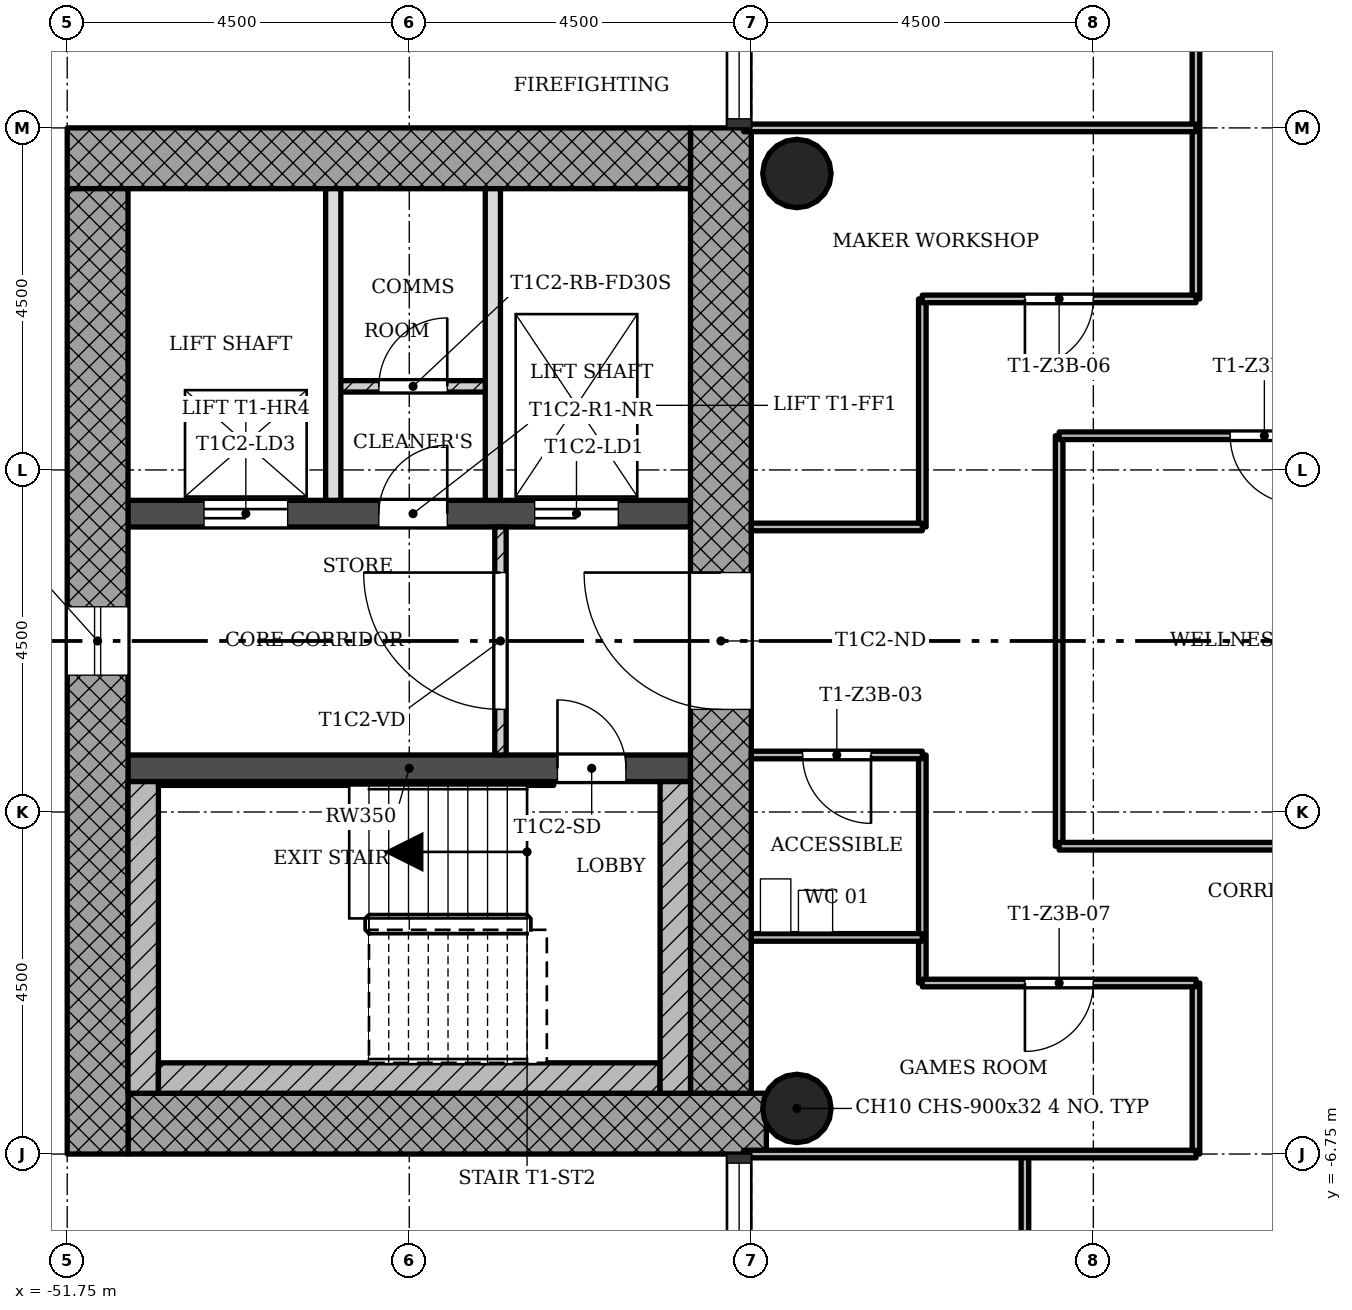
"""IFC4 building model, lengths in metres.
Left out: names, types, materials, properties, quantities, classifications, styles, units other than length and angle.
Written with IfcOpenShell. Run it as: python <this file> out.ifc"""

import sys

from ifc_helpers import new_model, si_unit, direction, frame, frame_2d, origin, origin_2d, place, context, subcontext, project, spatial, rectangle, hollow_circle, extrude, element, fill, save


model = new_model("IFC4")
c1 = context("Model", 3, precision=1e-05, world=origin(), true_north=direction((0.0, 1.0)))
c2 = subcontext(c1, "Body", "Model", "MODEL_VIEW")
j1 = project(units=[si_unit("LENGTHUNIT", "METRE"), si_unit("PLANEANGLEUNIT", "RADIAN")], contexts=[c1])
p1 = place(None, origin())
s1 = spatial("IfcSite", under=j1, at=p1, CompositionType="ELEMENT")
p2 = place(p1, origin())
s2 = spatial("IfcBuilding", under=s1, at=p2, CompositionType="ELEMENT")
p3 = place(p2, frame((0.0, 0.0, 147.3)))
s3 = spatial("IfcBuildingStorey", under=s2, at=p3, CompositionType="ELEMENT", Elevation=147.3)
p4 = place(p3, frame((-50.95, -6.35, 0.0), z_axis=(0.0, 0.0, 1.0), x_axis=(1.0, 0.0, 0.0)))
e1 = element("IfcWall", 1, at=p4, inside=s3, PredefinedType="SHEAR", context=c2, shape_type="SweptSolid", body=[
    extrude(rectangle(XDim=8.398, YDim=0.8, at=frame_2d((4.199, 0.0))), origin(), (0.0, 0.0, 1.0), 3.4),
])
p5 = place(p3, frame((-43.15, -5.95, 0.0), z_axis=(0.0, 0.0, 1.0), x_axis=(0.0, 1.0, 0.0)))
e2 = element("IfcWall", 2, at=p5, inside=s3, PredefinedType="SHEAR", context=c2, shape_type="SweptSolid", body=[
    extrude(rectangle(XDim=12.7, YDim=0.8, at=frame_2d((6.35, 0.0))), origin(), (0.0, 0.0, 1.0), 3.4),
])
p6 = place(p5, frame((5.05, 0.0, 0.0)))
e3 = element("IfcOpeningElement", 3, at=p6, cuts=e2, PredefinedType="OPENING", context=c2, shape_type="SweptSolid", body=[
    extrude(rectangle(XDim=1.8, YDim=2.1, at=frame_2d((0.9, 1.05))), frame((0.0, 0.41, 0.0), z_axis=(0.0, -1.0, 0.0), x_axis=(1.0, 0.0, 0.0)), (0.0, 0.0, 1.0), 0.82),
])
p7 = place(p3, frame((-43.55, 6.35, 0.0), z_axis=(0.0, 0.0, 1.0), x_axis=(-1.0, 0.0, 0.0)))
e4 = element("IfcWall", 4, at=p7, inside=s3, PredefinedType="SHEAR", context=c2, shape_type="SweptSolid", body=[
    extrude(rectangle(XDim=8.2, YDim=0.8, at=frame_2d((4.1, 0.0))), origin(), (0.0, 0.0, 1.0), 3.4),
])
p8 = place(p3, frame((-51.35, 5.95, 0.0), z_axis=(0.0, 0.0, 1.0), x_axis=(0.0, -1.0, 0.0)))
e5 = element("IfcWall", 5, at=p8, inside=s3, PredefinedType="SHEAR", context=c2, shape_type="SweptSolid", body=[
    extrude(rectangle(XDim=12.7, YDim=0.8, at=frame_2d((6.35, 0.0))), origin(), (0.0, 0.0, 1.0), 3.4),
])
p9 = place(p8, frame((5.5, 0.0, 0.45)))
e6 = element("IfcOpeningElement", 6, at=p9, cuts=e5, PredefinedType="OPENING", context=c2, shape_type="SweptSolid", body=[
    extrude(rectangle(XDim=0.9, YDim=2.4, at=frame_2d((0.45, 1.2))), frame((0.0, 0.41, 0.0), z_axis=(0.0, -1.0, 0.0), x_axis=(1.0, 0.0, 0.0)), (0.0, 0.0, 1.0), 0.82),
])
p10 = place(p3, frame((-50.95, -1.675, 0.0), z_axis=(0.0, 0.0, 1.0), x_axis=(1.0, 0.0, 0.0)))
e7 = element("IfcWall", 7, at=p10, inside=s3, PredefinedType="SHEAR", context=c2, shape_type="SweptSolid", body=[
    extrude(rectangle(XDim=7.4, YDim=0.35, at=frame_2d((3.7, 0.0))), origin(), (0.0, 0.0, 1.0), 3.4),
])
p11 = place(p10, frame((5.65, 0.0, 0.0)))
e8 = element("IfcOpeningElement", 8, at=p11, cuts=e7, PredefinedType="OPENING", context=c2, shape_type="SweptSolid", body=[
    extrude(rectangle(XDim=0.9, YDim=2.1, at=frame_2d((0.45, 1.05))), frame((0.0, 0.185, 0.0), z_axis=(0.0, -1.0, 0.0), x_axis=(1.0, 0.0, 0.0)), (0.0, 0.0, 1.0), 0.37),
])
p12 = place(p3, frame((-50.95, 1.675, 0.0), z_axis=(0.0, 0.0, 1.0), x_axis=(1.0, 0.0, 0.0)))
e9 = element("IfcWall", 9, at=p12, inside=s3, PredefinedType="SHEAR", context=c2, shape_type="SweptSolid", body=[
    extrude(rectangle(XDim=7.4, YDim=0.35, at=frame_2d((3.7, 0.0))), origin(), (0.0, 0.0, 1.0), 3.4),
])
p13 = place(p12, frame((5.35, 0.0, 0.0)))
e10 = element("IfcOpeningElement", 10, at=p13, cuts=e9, PredefinedType="OPENING", context=c2, shape_type="SweptSolid", body=[
    extrude(rectangle(XDim=1.1, YDim=2.1, at=frame_2d((0.55, 1.05))), frame((0.0, 0.185, 0.0), z_axis=(0.0, -1.0, 0.0), x_axis=(1.0, 0.0, 0.0)), (0.0, 0.0, 1.0), 0.37),
])
p14 = place(p12, frame((1.0, 0.0, 0.0)))
e11 = element("IfcOpeningElement", 11, at=p14, cuts=e9, PredefinedType="OPENING", context=c2, shape_type="SweptSolid", body=[
    extrude(rectangle(XDim=1.1, YDim=2.1, at=frame_2d((0.55, 1.05))), frame((0.0, 0.185, 0.0), z_axis=(0.0, -1.0, 0.0), x_axis=(1.0, 0.0, 0.0)), (0.0, 0.0, 1.0), 0.37),
])
p15 = place(p12, frame((3.3, 0.0, 0.0)))
e12 = element("IfcOpeningElement", 12, at=p15, cuts=e9, PredefinedType="OPENING", context=c2, shape_type="SweptSolid", body=[
    extrude(rectangle(XDim=0.9, YDim=2.1, at=frame_2d((0.45, 1.05))), frame((0.0, 0.185, 0.0), z_axis=(0.0, -1.0, 0.0), x_axis=(1.0, 0.0, 0.0)), (0.0, 0.0, 1.0), 0.37),
])
for number, where, z_axis, x_axis in (
    (13, (-42.15, -6.15, 0.0), (0.0, 0.0, 1.0), (1.0, 0.0, 0.0)),
    (14, (-42.15, 6.15, 0.0), (0.0, 0.0, 1.0), (1.0, 0.0, 0.0)),
):
    element("IfcColumn", number, at=place(p3, frame(where, z_axis=z_axis, x_axis=x_axis)), inside=s3, PredefinedType="COLUMN", context=c2, shape_type="SweptSolid", body=[
        extrude(hollow_circle(Radius=0.45, WallThickness=0.032, at=origin_2d()), origin(), (0.0, 0.0, 1.0), 3.4),
    ])
p16 = place(p3, frame((-46.05, 1.5, 0.0), z_axis=(0.0, 0.0, 1.0), x_axis=(0.0, -1.0, 0.0)))
e15 = element("IfcWall", 15, at=p16, inside=s3, PredefinedType="PARTITIONING", context=c2, shape_type="SweptSolid", body=[
    extrude(rectangle(XDim=3.0, YDim=0.15, at=frame_2d((1.5, 0.0))), origin(), (0.0, 0.0, 1.0), 3.0),
])
p17 = place(p16, frame((0.6, 0.0, 0.0)))
e16 = element("IfcOpeningElement", 16, at=p17, cuts=e15, PredefinedType="OPENING", context=c2, shape_type="SweptSolid", body=[
    extrude(rectangle(XDim=1.8, YDim=2.1, at=frame_2d((0.9, 1.05))), frame((0.0, 0.085, 0.0), z_axis=(0.0, -1.0, 0.0), x_axis=(1.0, 0.0, 0.0)), (0.0, 0.0, 1.0), 0.17),
])
for number, where, z_axis, x_axis in (
    (17, (-48.25, 5.95, 0.0), (0.0, 0.0, 1.0), (0.0, -1.0, 0.0)),
    (18, (-46.15, 5.95, 0.0), (0.0, 0.0, 1.0), (0.0, -1.0, 0.0)),
):
    element("IfcWall", number, at=place(p3, frame(where, z_axis=z_axis, x_axis=x_axis)), inside=s3, PredefinedType="SOLIDWALL", context=c2, shape_type="SweptSolid", body=[
        extrude(rectangle(XDim=4.1, YDim=0.2, at=frame_2d((2.05, 0.0))), origin(), (0.0, 0.0, 1.0), 3.0),
    ])
p18 = place(p3, frame((-46.15, 3.35, 0.0), z_axis=(0.0, 0.0, 1.0), x_axis=(-1.0, 0.0, 0.0)))
e19 = element("IfcWall", 19, at=p18, inside=s3, PredefinedType="PARTITIONING", context=c2, shape_type="SweptSolid", body=[
    extrude(rectangle(XDim=2.1, YDim=0.15, at=frame_2d((1.05, 0.0))), origin(), (0.0, 0.0, 1.0), 3.0),
])
p19 = place(p18, frame((0.6, 0.0, 0.0)))
e20 = element("IfcOpeningElement", 20, at=p19, cuts=e19, PredefinedType="OPENING", context=c2, shape_type="SweptSolid", body=[
    extrude(rectangle(XDim=0.9, YDim=2.1, at=frame_2d((0.45, 1.05))), frame((0.0, 0.085, 0.0), z_axis=(0.0, -1.0, 0.0), x_axis=(1.0, 0.0, 0.0)), (0.0, 0.0, 1.0), 0.17),
])
for number, where, z_axis, x_axis in (
    (21, (-40.5, -4.5, 0.0), (0.0, 0.0, 1.0), (0.0, 1.0, 0.0)),
    (22, (-40.5, 1.5, 0.0), (0.0, 0.0, 1.0), (0.0, 1.0, 0.0)),
):
    element("IfcWall", number, at=place(p3, frame(where, z_axis=z_axis, x_axis=x_axis)), inside=s3, PredefinedType="PARTITIONING", context=c2, shape_type="SweptSolid", body=[
        extrude(rectangle(XDim=3.0, YDim=0.1, at=frame_2d((1.5, 0.0))), origin(), (0.0, 0.0, 1.0), 3.0),
    ])
p20 = place(p3, frame((-39.15, -15.75, 0.0), z_axis=(0.0, 0.0, 1.0), x_axis=(0.0, 1.0, 0.0)))
e23 = element("IfcWall", 23, at=p20, inside=s3, PredefinedType="PARTITIONING", context=c2, shape_type="SweptSolid", body=[
    extrude(rectangle(XDim=9.0, YDim=0.1, at=frame_2d((4.5, 0.0))), origin(), (0.0, 0.0, 1.0), 3.0),
])
p21 = place(p20, frame((5.55, 0.0, 0.0)))
e24 = element("IfcOpeningElement", 24, at=p21, cuts=e23, PredefinedType="OPENING", context=c2, shape_type="SweptSolid", body=[
    extrude(rectangle(XDim=0.9, YDim=2.1, at=frame_2d((0.45, 1.05))), frame((0.0, 0.06, 0.0), z_axis=(0.0, -1.0, 0.0), x_axis=(1.0, 0.0, 0.0)), (0.0, 0.0, 1.0), 0.12),
])
p22 = place(p3, frame((-38.7, -2.7, 0.0), z_axis=(0.0, 0.0, 1.0), x_axis=(0.0, 1.0, 0.0)))
e25 = element("IfcWall", 25, at=p22, inside=s3, PredefinedType="PARTITIONING", context=c2, shape_type="SweptSolid", body=[
    extrude(rectangle(XDim=5.4, YDim=0.1, at=frame_2d((2.7, 0.0))), origin(), (0.0, 0.0, 1.0), 3.0),
])
p23 = place(p3, frame((-36.9, -6.75, 0.0), z_axis=(0.0, 0.0, 1.0), x_axis=(0.0, 1.0, 0.0)))
e26 = element("IfcWall", 26, at=p23, inside=s3, PredefinedType="PARTITIONING", context=c2, shape_type="SweptSolid", body=[
    extrude(rectangle(XDim=2.25, YDim=0.1, at=frame_2d((1.125, 0.0))), origin(), (0.0, 0.0, 1.0), 3.0),
])
p24 = place(p3, frame((-36.9, 4.5, 0.0), z_axis=(0.0, 0.0, 1.0), x_axis=(0.0, 1.0, 0.0)))
e27 = element("IfcWall", 27, at=p24, inside=s3, PredefinedType="PARTITIONING", context=c2, shape_type="SweptSolid", body=[
    extrude(rectangle(XDim=6.75, YDim=0.1, at=frame_2d((3.375, 0.0))), origin(), (0.0, 0.0, 1.0), 3.0),
])
p25 = place(p24, frame((4.05, 0.0, 0.0)))
e28 = element("IfcOpeningElement", 28, at=p25, cuts=e27, PredefinedType="OPENING", context=c2, shape_type="SweptSolid", body=[
    extrude(rectangle(XDim=0.9, YDim=2.1, at=frame_2d((0.45, 1.05))), frame((0.0, 0.06, 0.0), z_axis=(0.0, -1.0, 0.0), x_axis=(1.0, 0.0, 0.0)), (0.0, 0.0, 1.0), 0.12),
])
p26 = place(p3, frame((-42.85, -6.75, 0.0), z_axis=(0.0, 0.0, 1.0), x_axis=(1.0, 0.0, 0.0)))
e29 = element("IfcWall", 29, at=p26, inside=s3, PredefinedType="PARTITIONING", context=c2, shape_type="SweptSolid", body=[
    extrude(rectangle(XDim=5.95, YDim=0.1, at=frame_2d((2.975, 0.0))), origin(), (0.0, 0.0, 1.0), 3.0),
])
p27 = place(p3, frame((-40.5, -4.5, 0.0), z_axis=(0.0, 0.0, 1.0), x_axis=(1.0, 0.0, 0.0)))
e30 = element("IfcWall", 30, at=p27, inside=s3, PredefinedType="PARTITIONING", context=c2, shape_type="SweptSolid", body=[
    extrude(rectangle(XDim=3.6, YDim=0.1, at=frame_2d((1.8, 0.0))), origin(), (0.0, 0.0, 1.0), 3.0),
])
p28 = place(p27, frame((1.35, 0.0, 0.0)))
e31 = element("IfcOpeningElement", 31, at=p28, cuts=e30, PredefinedType="OPENING", context=c2, shape_type="SweptSolid", body=[
    extrude(rectangle(XDim=0.9, YDim=2.1, at=frame_2d((0.45, 1.05))), frame((0.0, 0.06, 0.0), z_axis=(0.0, -1.0, 0.0), x_axis=(1.0, 0.0, 0.0)), (0.0, 0.0, 1.0), 0.12),
])
p29 = place(p3, frame((-42.75, -3.9, 0.0), z_axis=(0.0, 0.0, 1.0), x_axis=(1.0, 0.0, 0.0)))
e32 = element("IfcWall", 32, at=p29, inside=s3, PredefinedType="PARTITIONING", context=c2, shape_type="SweptSolid", body=[
    extrude(rectangle(XDim=2.25, YDim=0.1, at=frame_2d((1.125, 0.0))), origin(), (0.0, 0.0, 1.0), 3.0),
])
p30 = place(p3, frame((-38.7, -2.7, 0.0), z_axis=(0.0, 0.0, 1.0), x_axis=(1.0, 0.0, 0.0)))
e33 = element("IfcWall", 33, at=p30, inside=s3, PredefinedType="PARTITIONING", context=c2, shape_type="SweptSolid", body=[
    extrude(rectangle(XDim=5.4, YDim=0.1, at=frame_2d((2.7, 0.0))), origin(), (0.0, 0.0, 1.0), 3.0),
])
p31 = place(p3, frame((-42.75, -1.5, 0.0), z_axis=(0.0, 0.0, 1.0), x_axis=(1.0, 0.0, 0.0)))
e34 = element("IfcWall", 34, at=p31, inside=s3, PredefinedType="PARTITIONING", context=c2, shape_type="SweptSolid", body=[
    extrude(rectangle(XDim=2.25, YDim=0.1, at=frame_2d((1.125, 0.0))), origin(), (0.0, 0.0, 1.0), 3.0),
])
p32 = place(p31, frame((0.675, 0.0, 0.0)))
e35 = element("IfcOpeningElement", 35, at=p32, cuts=e34, PredefinedType="OPENING", context=c2, shape_type="SweptSolid", body=[
    extrude(rectangle(XDim=0.9, YDim=2.1, at=frame_2d((0.45, 1.05))), frame((0.0, 0.06, 0.0), z_axis=(0.0, -1.0, 0.0), x_axis=(1.0, 0.0, 0.0)), (0.0, 0.0, 1.0), 0.12),
])
p33 = place(p3, frame((-42.75, 1.5, 0.0), z_axis=(0.0, 0.0, 1.0), x_axis=(1.0, 0.0, 0.0)))
e36 = element("IfcWall", 36, at=p33, inside=s3, PredefinedType="PARTITIONING", context=c2, shape_type="SweptSolid", body=[
    extrude(rectangle(XDim=2.25, YDim=0.1, at=frame_2d((1.125, 0.0))), origin(), (0.0, 0.0, 1.0), 3.0),
])
p34 = place(p3, frame((-38.7, 2.7, 0.0), z_axis=(0.0, 0.0, 1.0), x_axis=(1.0, 0.0, 0.0)))
e37 = element("IfcWall", 37, at=p34, inside=s3, PredefinedType="PARTITIONING", context=c2, shape_type="SweptSolid", body=[
    extrude(rectangle(XDim=5.4, YDim=0.1, at=frame_2d((2.7, 0.0))), origin(), (0.0, 0.0, 1.0), 3.0),
])
p35 = place(p34, frame((2.25, 0.0, 0.0)))
e38 = element("IfcOpeningElement", 38, at=p35, cuts=e37, PredefinedType="OPENING", context=c2, shape_type="SweptSolid", body=[
    extrude(rectangle(XDim=0.9, YDim=2.1, at=frame_2d((0.45, 1.05))), frame((0.0, 0.06, 0.0), z_axis=(0.0, -1.0, 0.0), x_axis=(1.0, 0.0, 0.0)), (0.0, 0.0, 1.0), 0.12),
])
p36 = place(p3, frame((-40.5, 4.5, 0.0), z_axis=(0.0, 0.0, 1.0), x_axis=(1.0, 0.0, 0.0)))
e39 = element("IfcWall", 39, at=p36, inside=s3, PredefinedType="PARTITIONING", context=c2, shape_type="SweptSolid", body=[
    extrude(rectangle(XDim=3.6, YDim=0.1, at=frame_2d((1.8, 0.0))), origin(), (0.0, 0.0, 1.0), 3.0),
])
p37 = place(p36, frame((1.35, 0.0, 0.0)))
e40 = element("IfcOpeningElement", 40, at=p37, cuts=e39, PredefinedType="OPENING", context=c2, shape_type="SweptSolid", body=[
    extrude(rectangle(XDim=0.9, YDim=2.1, at=frame_2d((0.45, 1.05))), frame((0.0, 0.06, 0.0), z_axis=(0.0, -1.0, 0.0), x_axis=(1.0, 0.0, 0.0)), (0.0, 0.0, 1.0), 0.12),
])
p38 = place(p3, frame((-42.85, 6.75, 0.0), z_axis=(0.0, 0.0, 1.0), x_axis=(1.0, 0.0, 0.0)))
e41 = element("IfcWall", 41, at=p38, inside=s3, PredefinedType="PARTITIONING", context=c2, shape_type="SweptSolid", body=[
    extrude(rectangle(XDim=5.95, YDim=0.1, at=frame_2d((2.975, 0.0))), origin(), (0.0, 0.0, 1.0), 3.0),
])
p39 = place(p3, frame((-50.75, -1.85, 0.0), z_axis=(0.0, 0.0, 1.0), x_axis=(0.0, -1.0, 0.0)))
e42 = element("IfcWall", 42, at=p39, inside=s3, PredefinedType="SHEAR", context=c2, shape_type="SweptSolid", body=[
    extrude(rectangle(XDim=4.1, YDim=0.4, at=frame_2d((2.05, 0.0))), origin(), (0.0, 0.0, 1.0), 3.4),
])
p40 = place(p3, frame((-43.95, -5.75, 0.0), z_axis=(0.0, 0.0, 1.0), x_axis=(-1.0, 0.0, 0.0)))
e43 = element("IfcWall", 43, at=p40, inside=s3, PredefinedType="SHEAR", context=c2, shape_type="SweptSolid", body=[
    extrude(rectangle(XDim=6.6, YDim=0.4, at=frame_2d((3.3, 0.0))), origin(), (0.0, 0.0, 1.0), 3.4),
])
p41 = place(p3, frame((-43.75, -1.85, 0.0), z_axis=(0.0, 0.0, 1.0), x_axis=(0.0, -1.0, 0.0)))
e44 = element("IfcWall", 44, at=p41, inside=s3, PredefinedType="SHEAR", context=c2, shape_type="SweptSolid", body=[
    extrude(rectangle(XDim=4.1, YDim=0.4, at=frame_2d((2.05, 0.0))), origin(), (0.0, 0.0, 1.0), 3.4),
])
p42 = place(p3, frame((-45.35, -1.875, 0.0), z_axis=(0.0, 0.0, 1.0), x_axis=(-1.0, 0.0, 0.0)))
e45 = element("IfcWall", 45, at=p42, inside=s3, PredefinedType="SHEAR", context=c2, shape_type="SweptSolid", body=[
    extrude(rectangle(XDim=5.2, YDim=0.05, at=frame_2d((2.6, 0.0))), origin(), (0.0, 0.0, 1.0), 3.4),
])
p43 = place(p9, origin())
e46 = element("IfcWindow", 46, at=p43, inside=s3, PartitioningType="SINGLE_PANEL", PredefinedType="WINDOW", context=c2, shape_type="SweptSolid", body=[
    extrude(rectangle(XDim=0.9, YDim=2.4, at=frame_2d((0.45, 1.2))), frame((0.0, 0.03, 0.0), z_axis=(0.0, -1.0, 0.0), x_axis=(1.0, 0.0, 0.0)), (0.0, 0.0, 1.0), 0.06),
])
fill(e6, e46)
p44 = place(p17, origin())
e47 = element("IfcDoor", 47, at=p44, inside=s3, OperationType="SINGLE_SWING_LEFT", PredefinedType="DOOR", context=c2, shape_type="SweptSolid", body=[
    extrude(rectangle(XDim=1.8, YDim=2.1, at=frame_2d((0.9, 1.05))), frame((0.0, 0.025, 0.0), z_axis=(0.0, -1.0, 0.0), x_axis=(1.0, 0.0, 0.0)), (0.0, 0.0, 1.0), 0.05),
])
fill(e16, e47)
p45 = place(p19, origin())
e48 = element("IfcDoor", 48, at=p45, inside=s3, OperationType="SINGLE_SWING_LEFT", PredefinedType="DOOR", context=c2, shape_type="SweptSolid", body=[
    extrude(rectangle(XDim=0.9, YDim=2.1, at=frame_2d((0.45, 1.05))), frame((0.0, 0.025, 0.0), z_axis=(0.0, -1.0, 0.0), x_axis=(1.0, 0.0, 0.0)), (0.0, 0.0, 1.0), 0.05),
])
fill(e20, e48)
p46 = place(p35, origin())
e49 = element("IfcDoor", 49, at=p46, inside=s3, OperationType="SINGLE_SWING_RIGHT", PredefinedType="DOOR", context=c2, shape_type="SweptSolid", body=[
    extrude(rectangle(XDim=0.9, YDim=2.1, at=frame_2d((0.45, 1.05))), frame((0.0, 0.025, 0.0), z_axis=(0.0, -1.0, 0.0), x_axis=(1.0, 0.0, 0.0)), (0.0, 0.0, 1.0), 0.05),
])
fill(e38, e49)
p47 = place(p32, origin())
e50 = element("IfcDoor", 50, at=p47, inside=s3, OperationType="SINGLE_SWING_RIGHT", PredefinedType="DOOR", context=c2, shape_type="SweptSolid", body=[
    extrude(rectangle(XDim=0.9, YDim=2.1, at=frame_2d((0.45, 1.05))), frame((0.0, 0.025, 0.0), z_axis=(0.0, -1.0, 0.0), x_axis=(1.0, 0.0, 0.0)), (0.0, 0.0, 1.0), 0.05),
])
fill(e35, e50)
p48 = place(p37, origin())
e51 = element("IfcDoor", 51, at=p48, inside=s3, OperationType="SINGLE_SWING_LEFT", PredefinedType="DOOR", context=c2, shape_type="SweptSolid", body=[
    extrude(rectangle(XDim=0.9, YDim=2.1, at=frame_2d((0.45, 1.05))), frame((0.0, 0.025, 0.0), z_axis=(0.0, -1.0, 0.0), x_axis=(1.0, 0.0, 0.0)), (0.0, 0.0, 1.0), 0.05),
])
fill(e40, e51)
p49 = place(p28, origin())
e52 = element("IfcDoor", 52, at=p49, inside=s3, OperationType="SINGLE_SWING_LEFT", PredefinedType="DOOR", context=c2, shape_type="SweptSolid", body=[
    extrude(rectangle(XDim=0.9, YDim=2.1, at=frame_2d((0.45, 1.05))), frame((0.0, 0.025, 0.0), z_axis=(0.0, -1.0, 0.0), x_axis=(1.0, 0.0, 0.0)), (0.0, 0.0, 1.0), 0.05),
])
fill(e31, e52)
p50 = place(p11, origin())
e53 = element("IfcDoor", 53, at=p50, inside=s3, OperationType="SINGLE_SWING_RIGHT", PredefinedType="DOOR", context=c2, shape_type="SweptSolid", body=[
    extrude(rectangle(XDim=0.9, YDim=2.1, at=frame_2d((0.45, 1.05))), frame((0.0, 0.025, 0.0), z_axis=(0.0, -1.0, 0.0), x_axis=(1.0, 0.0, 0.0)), (0.0, 0.0, 1.0), 0.05),
])
fill(e8, e53)
p51 = place(p13, origin())
e54 = element("IfcDoor", 54, at=p51, inside=s3, OperationType="SLIDING_TO_LEFT", PredefinedType="DOOR", context=c2, shape_type="SweptSolid", body=[
    extrude(rectangle(XDim=1.1, YDim=2.1, at=frame_2d((0.55, 1.05))), frame((0.0, 0.025, 0.0), z_axis=(0.0, -1.0, 0.0), x_axis=(1.0, 0.0, 0.0)), (0.0, 0.0, 1.0), 0.05),
])
fill(e10, e54)
p52 = place(p14, origin())
e55 = element("IfcDoor", 55, at=p52, inside=s3, OperationType="SLIDING_TO_LEFT", PredefinedType="DOOR", context=c2, shape_type="SweptSolid", body=[
    extrude(rectangle(XDim=1.1, YDim=2.1, at=frame_2d((0.55, 1.05))), frame((0.0, 0.025, 0.0), z_axis=(0.0, -1.0, 0.0), x_axis=(1.0, 0.0, 0.0)), (0.0, 0.0, 1.0), 0.05),
])
fill(e11, e55)
p53 = place(p15, origin())
e56 = element("IfcDoor", 56, at=p53, inside=s3, OperationType="SINGLE_SWING_LEFT", PredefinedType="DOOR", context=c2, shape_type="SweptSolid", body=[
    extrude(rectangle(XDim=0.9, YDim=2.1, at=frame_2d((0.45, 1.05))), frame((0.0, 0.025, 0.0), z_axis=(0.0, -1.0, 0.0), x_axis=(1.0, 0.0, 0.0)), (0.0, 0.0, 1.0), 0.05),
])
fill(e12, e56)
p54 = place(p6, origin())
e57 = element("IfcDoor", 57, at=p54, inside=s3, OperationType="SINGLE_SWING_LEFT", PredefinedType="DOOR", context=c2, shape_type="SweptSolid", body=[
    extrude(rectangle(XDim=1.8, YDim=2.1, at=frame_2d((0.9, 1.05))), frame((0.0, 0.025, 0.0), z_axis=(0.0, -1.0, 0.0), x_axis=(1.0, 0.0, 0.0)), (0.0, 0.0, 1.0), 0.05),
])
fill(e3, e57)
save(model, sys.argv[1])
